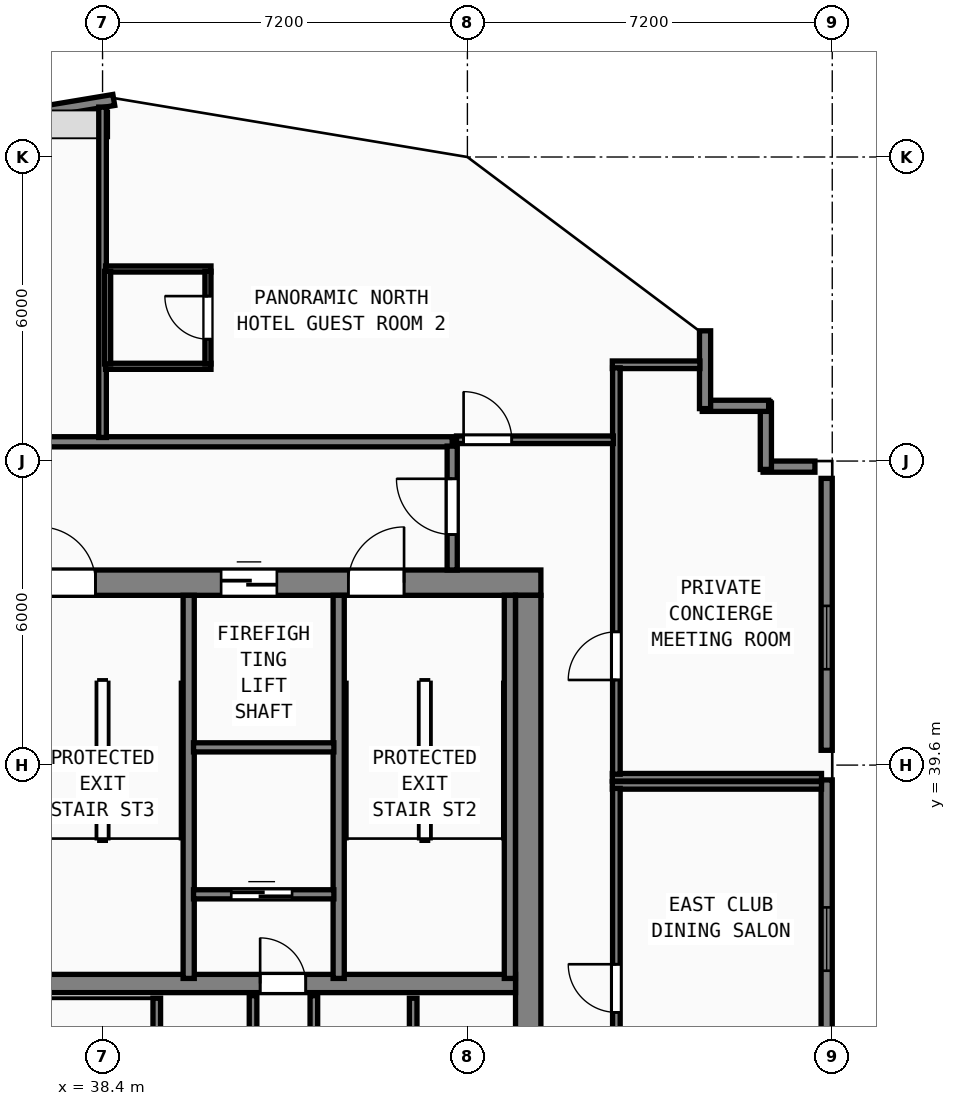
"""IFC4 building model, lengths in metres.
Left out: names, types, materials, properties, quantities, classifications, styles, units other than length and angle.
Written with IfcOpenShell. Run it as: python <this file> out.ifc"""

import sys

from ifc_helpers import new_model, si_unit, direction, frame, frame_2d, origin, origin_2d, place, context, subcontext, project, spatial, rectangle, hollow_rectangle, extrude, element, fill, save


model = new_model("IFC4")
c1 = context("Model", 3, precision=1e-05, world=origin(), true_north=direction((0.0, 1.0)))
c2 = subcontext(c1, "Body", "Model", "MODEL_VIEW")
j1 = project(units=[si_unit("LENGTHUNIT", "METRE"), si_unit("PLANEANGLEUNIT", "RADIAN")], contexts=[c1])
p1 = place(None, origin())
s1 = spatial("IfcSite", under=j1, at=p1, CompositionType="ELEMENT")
p2 = place(p1, origin())
s2 = spatial("IfcBuilding", under=s1, at=p2, CompositionType="ELEMENT")
p3 = place(p2, frame((0.0, 0.0, 282.2)))
s3 = spatial("IfcBuildingStorey", under=s2, at=p3, CompositionType="ELEMENT", Elevation=282.2)
p4 = place(p3, frame((29.75, 43.2, 0.0), z_axis=(0.0, 0.0, 1.0), x_axis=(1.0, 0.0, 0.0)))
e1 = element("IfcWall", 1, at=p4, inside=s3, PredefinedType="SHEAR", context=c2, shape_type="SweptSolid", body=[
    extrude(rectangle(XDim=17.3, YDim=0.5, at=frame_2d((8.65, 0.0))), origin(), (0.0, 0.0, 1.0), 3.72),
])
p5 = place(p4, frame((2.3, 0.0, 0.0)))
e2 = element("IfcOpeningElement", 2, at=p5, cuts=e1, PredefinedType="OPENING", context=c2, shape_type="SweptSolid", body=[
    extrude(rectangle(XDim=1.1, YDim=2.15, at=frame_2d((0.55, 1.075))), frame((0.0, 0.26, 0.0), z_axis=(0.0, -1.0, 0.0), x_axis=(1.0, 0.0, 0.0)), (0.0, 0.0, 1.0), 0.52),
])
p6 = place(p4, frame((7.41, 0.0, 0.0)))
e3 = element("IfcOpeningElement", 3, at=p6, cuts=e1, PredefinedType="OPENING", context=c2, shape_type="SweptSolid", body=[
    extrude(rectangle(XDim=1.1, YDim=2.15, at=frame_2d((0.55, 1.075))), frame((0.0, 0.26, 0.0), z_axis=(0.0, -1.0, 0.0), x_axis=(1.0, 0.0, 0.0)), (0.0, 0.0, 1.0), 0.52),
])
p7 = place(p4, frame((13.5, 0.0, 0.0)))
e4 = element("IfcOpeningElement", 4, at=p7, cuts=e1, PredefinedType="OPENING", context=c2, shape_type="SweptSolid", body=[
    extrude(rectangle(XDim=1.1, YDim=2.15, at=frame_2d((0.55, 1.075))), frame((0.0, 0.26, 0.0), z_axis=(0.0, -1.0, 0.0), x_axis=(1.0, 0.0, 0.0)), (0.0, 0.0, 1.0), 0.52),
])
p8 = place(p4, frame((4.63, 0.0, 0.0)))
e5 = element("IfcOpeningElement", 5, at=p8, cuts=e1, PredefinedType="OPENING", context=c2, shape_type="SweptSolid", body=[
    extrude(rectangle(XDim=1.1, YDim=2.2, at=frame_2d((0.55, 1.1))), frame((0.0, 0.26, 0.0), z_axis=(0.0, -1.0, 0.0), x_axis=(1.0, 0.0, 0.0)), (0.0, 0.0, 1.0), 0.52),
])
p9 = place(p4, frame((10.99, 0.0, 0.0)))
e6 = element("IfcOpeningElement", 6, at=p9, cuts=e1, PredefinedType="OPENING", context=c2, shape_type="SweptSolid", body=[
    extrude(rectangle(XDim=1.1, YDim=2.2, at=frame_2d((0.55, 1.1))), frame((0.0, 0.26, 0.0), z_axis=(0.0, -1.0, 0.0), x_axis=(1.0, 0.0, 0.0)), (0.0, 0.0, 1.0), 0.52),
])
p10 = place(p3, frame((46.8, 32.8, 0.0), z_axis=(0.0, 0.0, 1.0), x_axis=(0.0, 1.0, 0.0)))
e7 = element("IfcWall", 7, at=p10, inside=s3, PredefinedType="SHEAR", context=c2, shape_type="SweptSolid", body=[
    extrude(rectangle(XDim=10.15, YDim=0.5, at=frame_2d((5.075, 0.0))), origin(), (0.0, 0.0, 1.0), 3.72),
])
p11 = place(p3, frame((30.25, 35.29, 0.0), z_axis=(0.0, 0.0, 1.0), x_axis=(1.0, 0.0, 0.0)))
e8 = element("IfcWall", 8, at=p11, inside=s3, PredefinedType="SHEAR", context=c2, shape_type="SweptSolid", body=[
    extrude(rectangle(XDim=16.3, YDim=0.36, at=frame_2d((8.15, 0.0))), origin(), (0.0, 0.0, 1.0), 3.72),
])
p12 = place(p11, frame((5.1, 0.0, 0.0), z_axis=(0.0, 0.0, 1.0), x_axis=(-1.0, 0.0, 0.0)))
e9 = element("IfcOpeningElement", 9, at=p12, cuts=e8, PredefinedType="OPENING", context=c2, shape_type="SweptSolid", body=[
    extrude(rectangle(XDim=0.9, YDim=2.1, at=frame_2d((0.45, 1.05))), frame((0.0, 0.19, 0.0), z_axis=(0.0, -1.0, 0.0), x_axis=(1.0, 0.0, 0.0)), (0.0, 0.0, 1.0), 0.38),
])
p13 = place(p11, frame((12.16, 0.0, 0.0), z_axis=(0.0, 0.0, 1.0), x_axis=(-1.0, 0.0, 0.0)))
e10 = element("IfcOpeningElement", 10, at=p13, cuts=e8, PredefinedType="OPENING", context=c2, shape_type="SweptSolid", body=[
    extrude(rectangle(XDim=0.9, YDim=2.1, at=frame_2d((0.45, 1.05))), frame((0.0, 0.19, 0.0), z_axis=(0.0, -1.0, 0.0), x_axis=(1.0, 0.0, 0.0)), (0.0, 0.0, 1.0), 0.38),
])
for number, where, z_axis, x_axis in (
    (11, (40.1, 35.39, 0.0), (0.0, 0.0, 1.0), (0.0, 1.0, 0.0)),
    (12, (43.06, 35.39, 0.0), (0.0, 0.0, 1.0), (0.0, 1.0, 0.0)),
    (13, (46.438, 35.39, 0.0), (0.0, 0.0, 1.0), (0.0, 1.0, 0.0)),
):
    element("IfcWall", number, at=place(p3, frame(where, z_axis=z_axis, x_axis=x_axis)), inside=s3, PredefinedType="SHEAR", context=c2, shape_type="SweptSolid", body=[
        extrude(rectangle(XDim=7.56, YDim=0.22, at=frame_2d((3.78, 0.0))), origin(), (0.0, 0.0, 1.0), 3.72),
    ])
for number, where, z_axis, x_axis in (
    (14, (52.8, 45.6, 0.0), (0.0, 0.0, 1.0), (1.0, 0.0, 0.0)),
    (15, (45.6, 50.4, 0.0), (0.0, 0.0, 1.0), (1.0, 0.0, 0.0)),
):
    element("IfcColumn", number, at=place(p3, frame(where, z_axis=z_axis, x_axis=x_axis)), inside=s3, PredefinedType="COLUMN", context=c2, shape_type="SweptSolid", body=[
        extrude(hollow_rectangle(XDim=0.7, YDim=0.7, WallThickness=0.026, at=origin_2d()), origin(), (0.0, 0.0, 1.0), 3.9),
    ])
for number, where, z_axis, x_axis in (
    (16, (52.8, 39.6, 0.0), (0.0, 0.0, 1.0), (1.0, 0.0, 0.0)),
    (17, (38.4, 50.4, 0.0), (0.0, 0.0, 1.0), (1.0, 0.0, 0.0)),
):
    element("IfcColumn", number, at=place(p3, frame(where, z_axis=z_axis, x_axis=x_axis)), inside=s3, PredefinedType="COLUMN", context=c2, shape_type="SweptSolid", body=[
        extrude(hollow_rectangle(XDim=0.6, YDim=0.6, WallThickness=0.024, at=origin_2d()), origin(), (0.0, 0.0, 1.0), 3.9),
    ])
p14 = place(p3, frame((52.69, 33.942, 0.0), z_axis=(0.0, 0.0, 1.0), x_axis=(0.0, 1.0, 0.0)))
e18 = element("IfcWall", 18, at=p14, inside=s3, PredefinedType="SOLIDWALL", context=c2, shape_type="SweptSolid", body=[
    extrude(rectangle(XDim=5.366, YDim=0.22, at=frame_2d((2.683, 0.0))), origin(), (0.0, 0.0, 1.0), 3.365),
])
p15 = place(p14, frame((1.6, 0.0, 0.85)))
e19 = element("IfcOpeningElement", 19, at=p15, cuts=e18, PredefinedType="OPENING", context=c2, shape_type="SweptSolid", body=[
    extrude(rectangle(XDim=1.25, YDim=1.95, at=frame_2d((0.625, 0.975))), frame((0.0, 0.12, 0.0), z_axis=(0.0, -1.0, 0.0), x_axis=(1.0, 0.0, 0.0)), (0.0, 0.0, 1.0), 0.24),
])
p16 = place(p3, frame((52.69, 39.892, 0.0), z_axis=(0.0, 0.0, 1.0), x_axis=(0.0, 1.0, 0.0)))
e20 = element("IfcWall", 20, at=p16, inside=s3, PredefinedType="SOLIDWALL", context=c2, shape_type="SweptSolid", body=[
    extrude(rectangle(XDim=5.366, YDim=0.22, at=frame_2d((2.683, 0.0))), origin(), (0.0, 0.0, 1.0), 3.365),
])
p17 = place(p16, frame((1.6, 0.0, 0.85)))
e21 = element("IfcOpeningElement", 21, at=p17, cuts=e20, PredefinedType="OPENING", context=c2, shape_type="SweptSolid", body=[
    extrude(rectangle(XDim=1.25, YDim=1.95, at=frame_2d((0.625, 0.975))), frame((0.0, 0.12, 0.0), z_axis=(0.0, -1.0, 0.0), x_axis=(1.0, 0.0, 0.0)), (0.0, 0.0, 1.0), 0.24),
])
p18 = place(p3, frame((52.458, 45.49, 0.0), z_axis=(0.0, 0.0, 1.0), x_axis=(-1.0, 0.0, 0.0)))
e22 = element("IfcWall", 22, at=p18, inside=s3, PredefinedType="SOLIDWALL", context=c2, shape_type="SweptSolid", body=[
    extrude(rectangle(XDim=1.023, YDim=0.22, at=frame_2d((0.511, 0.0))), origin(), (0.0, 0.0, 1.0), 3.72),
])
p19 = place(p3, frame((51.49, 45.435, 0.0), z_axis=(0.0, 0.0, 1.0), x_axis=(0.0, 1.0, 0.0)))
e23 = element("IfcWall", 23, at=p19, inside=s3, PredefinedType="SOLIDWALL", context=c2, shape_type="SweptSolid", body=[
    extrude(rectangle(XDim=1.31, YDim=0.22, at=frame_2d((0.655, 0.0))), origin(), (0.0, 0.0, 1.0), 3.72),
])
p20 = place(p3, frame((51.545, 46.69, 0.0), z_axis=(0.0, 0.0, 1.0), x_axis=(-1.0, 0.0, 0.0)))
e24 = element("IfcWall", 24, at=p20, inside=s3, PredefinedType="SOLIDWALL", context=c2, shape_type="SweptSolid", body=[
    extrude(rectangle(XDim=1.31, YDim=0.22, at=frame_2d((0.655, 0.0))), origin(), (0.0, 0.0, 1.0), 3.72),
])
p21 = place(p3, frame((50.29, 46.635, 0.0), z_axis=(0.0, 0.0, 1.0), x_axis=(0.0, 1.0, 0.0)))
e25 = element("IfcWall", 25, at=p21, inside=s3, PredefinedType="SOLIDWALL", context=c2, shape_type="SweptSolid", body=[
    extrude(rectangle(XDim=1.535, YDim=0.22, at=frame_2d((0.768, 0.0))), origin(), (0.0, 0.0, 1.0), 3.72),
])
p22 = place(p3, frame((38.622, 52.726, 0.0), z_axis=(0.0, 0.0, 1.0), x_axis=(-0.986390420428, -0.164420006349, 0.0)))
e26 = element("IfcWall", 26, at=p22, inside=s3, PredefinedType="SOLIDWALL", context=c2, shape_type="SweptSolid", body=[
    extrude(rectangle(XDim=7.534, YDim=0.22, at=frame_2d((3.767, 0.0))), origin(), (0.0, 0.0, 1.0), 3.72),
])
p23 = place(p22, frame((1.6, 0.0, 0.85)))
e27 = element("IfcOpeningElement", 27, at=p23, cuts=e26, PredefinedType="OPENING", context=c2, shape_type="SweptSolid", body=[
    extrude(rectangle(XDim=1.25, YDim=1.95, at=frame_2d((0.625, 0.975))), frame((0.0, 0.12, 0.0), z_axis=(0.0, -1.0, 0.0), x_axis=(1.0, 0.0, 0.0)), (0.0, 0.0, 1.0), 0.24),
])
p24 = place(p3, frame((31.5, 45.98, 0.0), z_axis=(0.0, 0.0, 1.0), x_axis=(1.0, 0.0, 0.0)))
e28 = element("IfcWall", 28, at=p24, inside=s3, PredefinedType="SOLIDWALL", context=c2, shape_type="SweptSolid", body=[
    extrude(rectangle(XDim=13.8, YDim=0.2, at=frame_2d((6.9, 0.0))), origin(), (0.0, 0.0, 1.0), 3.72),
])
p25 = place(p3, frame((45.3, 43.45, 0.0), z_axis=(0.0, 0.0, 1.0), x_axis=(0.0, 1.0, 0.0)))
e29 = element("IfcWall", 29, at=p25, inside=s3, PredefinedType="SOLIDWALL", context=c2, shape_type="SweptSolid", body=[
    extrude(rectangle(XDim=2.445, YDim=0.2, at=frame_2d((1.223, 0.0))), origin(), (0.0, 0.0, 1.0), 3.72),
])
p26 = place(p25, frame((0.7, 0.0, 0.0)))
e30 = element("IfcOpeningElement", 30, at=p26, cuts=e29, PredefinedType="OPENING", context=c2, shape_type="SweptSolid", body=[
    extrude(rectangle(XDim=1.1, YDim=2.15, at=frame_2d((0.55, 1.075))), frame((0.0, 0.11, 0.0), z_axis=(0.0, -1.0, 0.0), x_axis=(1.0, 0.0, 0.0)), (0.0, 0.0, 1.0), 0.22),
])
p27 = place(p3, frame((40.195, 39.95, 0.0), z_axis=(0.0, 0.0, 1.0), x_axis=(1.0, 0.0, 0.0)))
e31 = element("IfcWall", 31, at=p27, inside=s3, PredefinedType="SOLIDWALL", context=c2, shape_type="SweptSolid", body=[
    extrude(rectangle(XDim=2.77, YDim=0.18, at=frame_2d((1.385, 0.0))), origin(), (0.0, 0.0, 1.0), 3.72),
])
p28 = place(p3, frame((40.195, 37.05, 0.0), z_axis=(0.0, 0.0, 1.0), x_axis=(1.0, 0.0, 0.0)))
e32 = element("IfcWall", 32, at=p28, inside=s3, PredefinedType="SOLIDWALL", context=c2, shape_type="SweptSolid", body=[
    extrude(rectangle(XDim=2.77, YDim=0.18, at=frame_2d((1.385, 0.0))), origin(), (0.0, 0.0, 1.0), 3.72),
])
p29 = place(p28, frame((1.945, 0.0, 0.0), z_axis=(0.0, 0.0, 1.0), x_axis=(-1.0, 0.0, 0.0)))
e33 = element("IfcOpeningElement", 33, at=p29, cuts=e32, PredefinedType="OPENING", context=c2, shape_type="SweptSolid", body=[
    extrude(rectangle(XDim=1.2, YDim=2.2, at=frame_2d((0.6, 1.1))), frame((0.0, 0.1, 0.0), z_axis=(0.0, -1.0, 0.0), x_axis=(1.0, 0.0, 0.0)), (0.0, 0.0, 1.0), 0.2),
])
for number, where, z_axis, x_axis in (
    (34, (41.37, 32.88, 0.0), (0.0, 0.0, 1.0), (0.0, 1.0, 0.0)),
    (35, (42.57, 32.88, 0.0), (0.0, 0.0, 1.0), (0.0, 1.0, 0.0)),
):
    element("IfcWall", number, at=place(p3, frame(where, z_axis=z_axis, x_axis=x_axis)), inside=s3, PredefinedType="SOLIDWALL", context=c2, shape_type="SweptSolid", body=[
        extrude(rectangle(XDim=2.17, YDim=0.15, at=frame_2d((1.085, 0.0))), origin(), (0.0, 0.0, 1.0), 3.72),
    ])
for number, where, z_axis, x_axis in (
    (36, (39.47, 32.95, 0.0), (0.0, 0.0, 1.0), (0.0, 1.0, 0.0)),
    (37, (44.53, 32.95, 0.0), (0.0, 0.0, 1.0), (0.0, 1.0, 0.0)),
):
    element("IfcWall", number, at=place(p3, frame(where, z_axis=z_axis, x_axis=x_axis)), inside=s3, PredefinedType="SOLIDWALL", context=c2, shape_type="SweptSolid", body=[
        extrude(rectangle(XDim=2.05, YDim=0.15, at=frame_2d((1.025, 0.0))), origin(), (0.0, 0.0, 1.0), 3.72),
    ])
p30 = place(p3, frame((48.46, 39.2, 0.0), z_axis=(0.0, 0.0, 1.0), x_axis=(1.0, 0.0, 0.0)))
e38 = element("IfcWall", 38, at=p30, inside=s3, PredefinedType="PARTITIONING", context=c2, shape_type="SweptSolid", body=[
    extrude(rectangle(XDim=4.128, YDim=0.15, at=frame_2d((2.064, 0.0))), origin(), (0.0, 0.0, 1.0), 3.72),
])
p31 = place(p3, frame((48.54, 33.06, 0.0), z_axis=(0.0, 0.0, 1.0), x_axis=(0.0, 1.0, 0.0)))
e39 = element("IfcWall", 39, at=p31, inside=s3, PredefinedType="PARTITIONING", context=c2, shape_type="SweptSolid", body=[
    extrude(rectangle(XDim=6.08, YDim=0.15, at=frame_2d((3.04, 0.0))), origin(), (0.0, 0.0, 1.0), 3.72),
])
p32 = place(p31, frame((1.66, 0.0, 0.0)))
e40 = element("IfcOpeningElement", 40, at=p32, cuts=e39, PredefinedType="OPENING", context=c2, shape_type="SweptSolid", body=[
    extrude(rectangle(XDim=0.95, YDim=2.12, at=frame_2d((0.475, 1.06))), frame((0.0, 0.085, 0.0), z_axis=(0.0, -1.0, 0.0), x_axis=(1.0, 0.0, 0.0)), (0.0, 0.0, 1.0), 0.17),
])
p33 = place(p3, frame((48.46, 47.5, 0.0), z_axis=(0.0, 0.0, 1.0), x_axis=(1.0, 0.0, 0.0)))
e41 = element("IfcWall", 41, at=p33, inside=s3, PredefinedType="PARTITIONING", context=c2, shape_type="SweptSolid", body=[
    extrude(rectangle(XDim=1.728, YDim=0.15, at=frame_2d((0.864, 0.0))), origin(), (0.0, 0.0, 1.0), 3.72),
])
p34 = place(p3, frame((48.46, 39.36, 0.0), z_axis=(0.0, 0.0, 1.0), x_axis=(1.0, 0.0, 0.0)))
e42 = element("IfcWall", 42, at=p34, inside=s3, PredefinedType="PARTITIONING", context=c2, shape_type="SweptSolid", body=[
    extrude(rectangle(XDim=4.128, YDim=0.15, at=frame_2d((2.064, 0.0))), origin(), (0.0, 0.0, 1.0), 3.72),
])
p35 = place(p3, frame((48.54, 39.42, 0.0), z_axis=(0.0, 0.0, 1.0), x_axis=(0.0, 1.0, 0.0)))
e43 = element("IfcWall", 43, at=p35, inside=s3, PredefinedType="PARTITIONING", context=c2, shape_type="SweptSolid", body=[
    extrude(rectangle(XDim=8.02, YDim=0.15, at=frame_2d((4.01, 0.0))), origin(), (0.0, 0.0, 1.0), 3.72),
])
p36 = place(p35, frame((1.86, 0.0, 0.0)))
e44 = element("IfcOpeningElement", 44, at=p36, cuts=e43, PredefinedType="OPENING", context=c2, shape_type="SweptSolid", body=[
    extrude(rectangle(XDim=0.95, YDim=2.12, at=frame_2d((0.475, 1.06))), frame((0.0, 0.085, 0.0), z_axis=(0.0, -1.0, 0.0), x_axis=(1.0, 0.0, 0.0)), (0.0, 0.0, 1.0), 0.17),
])
p37 = place(p3, frame((38.4, 46.065, 0.0), z_axis=(0.0, 0.0, 1.0), x_axis=(0.0, 1.0, 0.0)))
e45 = element("IfcWall", 45, at=p37, inside=s3, PredefinedType="PARTITIONING", context=c2, shape_type="SweptSolid", body=[
    extrude(rectangle(XDim=6.52, YDim=0.15, at=frame_2d((3.26, 0.0))), origin(), (0.0, 0.0, 1.0), 3.72),
])
p38 = place(p3, frame((45.385, 46.02, 0.0), z_axis=(0.0, 0.0, 1.0), x_axis=(1.0, 0.0, 0.0)))
e46 = element("IfcWall", 46, at=p38, inside=s3, PredefinedType="PARTITIONING", context=c2, shape_type="SweptSolid", body=[
    extrude(rectangle(XDim=3.095, YDim=0.15, at=frame_2d((1.547, 0.0))), origin(), (0.0, 0.0, 1.0), 3.72),
])
p39 = place(p38, frame((0.14, 0.0, 0.0)))
e47 = element("IfcOpeningElement", 47, at=p39, cuts=e46, PredefinedType="OPENING", context=c2, shape_type="SweptSolid", body=[
    extrude(rectangle(XDim=0.95, YDim=2.15, at=frame_2d((0.475, 1.075))), frame((0.0, 0.085, 0.0), z_axis=(0.0, -1.0, 0.0), x_axis=(1.0, 0.0, 0.0)), (0.0, 0.0, 1.0), 0.17),
])
for number, where, z_axis, x_axis in (
    (48, (38.46, 49.39, 0.0), (0.0, 0.0, 1.0), (1.0, 0.0, 0.0)),
    (49, (38.46, 47.47, 0.0), (0.0, 0.0, 1.0), (1.0, 0.0, 0.0)),
):
    element("IfcWall", number, at=place(p3, frame(where, z_axis=z_axis, x_axis=x_axis)), inside=s3, PredefinedType="PARTITIONING", context=c2, shape_type="SweptSolid", body=[
        extrude(rectangle(XDim=2.08, YDim=0.12, at=frame_2d((1.04, 0.0))), origin(), (0.0, 0.0, 1.0), 3.72),
    ])
p40 = place(p3, frame((38.5, 47.515, 0.0), z_axis=(0.0, 0.0, 1.0), x_axis=(0.0, 1.0, 0.0)))
e50 = element("IfcWall", 50, at=p40, inside=s3, PredefinedType="PARTITIONING", context=c2, shape_type="SweptSolid", body=[
    extrude(rectangle(XDim=1.83, YDim=0.12, at=frame_2d((0.915, 0.0))), origin(), (0.0, 0.0, 1.0), 3.72),
])
p41 = place(p3, frame((40.48, 47.515, 0.0), z_axis=(0.0, 0.0, 1.0), x_axis=(0.0, 1.0, 0.0)))
e51 = element("IfcWall", 51, at=p41, inside=s3, PredefinedType="PARTITIONING", context=c2, shape_type="SweptSolid", body=[
    extrude(rectangle(XDim=1.83, YDim=0.12, at=frame_2d((0.915, 0.0))), origin(), (0.0, 0.0, 1.0), 3.72),
])
p42 = place(p41, frame((0.49, 0.0, 0.0)))
e52 = element("IfcOpeningElement", 52, at=p42, cuts=e51, PredefinedType="OPENING", context=c2, shape_type="SweptSolid", body=[
    extrude(rectangle(XDim=0.85, YDim=2.1, at=frame_2d((0.425, 1.05))), frame((0.0, 0.07, 0.0), z_axis=(0.0, -1.0, 0.0), x_axis=(1.0, 0.0, 0.0)), (0.0, 0.0, 1.0), 0.14),
])
p43 = place(p15, origin())
e53 = element("IfcWindow", 53, at=p43, inside=s3, PartitioningType="SINGLE_PANEL", PredefinedType="WINDOW", context=c2, shape_type="SweptSolid", body=[
    extrude(rectangle(XDim=1.25, YDim=1.95, at=frame_2d((0.625, 0.975))), frame((0.0, 0.03, 0.0), z_axis=(0.0, -1.0, 0.0), x_axis=(1.0, 0.0, 0.0)), (0.0, 0.0, 1.0), 0.06),
])
fill(e19, e53)
p44 = place(p17, origin())
e54 = element("IfcWindow", 54, at=p44, inside=s3, PartitioningType="SINGLE_PANEL", PredefinedType="WINDOW", context=c2, shape_type="SweptSolid", body=[
    extrude(rectangle(XDim=1.25, YDim=1.95, at=frame_2d((0.625, 0.975))), frame((0.0, 0.03, 0.0), z_axis=(0.0, -1.0, 0.0), x_axis=(1.0, 0.0, 0.0)), (0.0, 0.0, 1.0), 0.06),
])
fill(e21, e54)
p45 = place(p6, origin())
e55 = element("IfcDoor", 55, at=p45, inside=s3, OperationType="SINGLE_SWING_LEFT", PredefinedType="DOOR", context=c2, shape_type="SweptSolid", body=[
    extrude(rectangle(XDim=1.1, YDim=2.15, at=frame_2d((0.55, 1.075))), frame((0.0, 0.185, 0.0), z_axis=(0.0, -1.0, 0.0), x_axis=(1.0, 0.0, 0.0)), (0.0, 0.0, 1.0), 0.05),
])
fill(e3, e55)
p46 = place(p7, origin())
e56 = element("IfcDoor", 56, at=p46, inside=s3, OperationType="SINGLE_SWING_RIGHT", PredefinedType="DOOR", context=c2, shape_type="SweptSolid", body=[
    extrude(rectangle(XDim=1.1, YDim=2.15, at=frame_2d((0.55, 1.075))), frame((0.0, 0.185, 0.0), z_axis=(0.0, -1.0, 0.0), x_axis=(1.0, 0.0, 0.0)), (0.0, 0.0, 1.0), 0.05),
])
fill(e4, e56)
p47 = place(p26, origin())
e57 = element("IfcDoor", 57, at=p47, inside=s3, OperationType="SINGLE_SWING_RIGHT", PredefinedType="DOOR", context=c2, shape_type="SweptSolid", body=[
    extrude(rectangle(XDim=1.1, YDim=2.15, at=frame_2d((0.55, 1.075))), frame((0.0, 0.025, 0.0), z_axis=(0.0, -1.0, 0.0), x_axis=(1.0, 0.0, 0.0)), (0.0, 0.0, 1.0), 0.05),
])
fill(e30, e57)
p48 = place(p9, origin())
e58 = element("IfcDoor", 58, at=p48, inside=s3, OperationType="SLIDING_TO_LEFT", PredefinedType="DOOR", context=c2, shape_type="SweptSolid", body=[
    extrude(rectangle(XDim=1.1, YDim=2.2, at=frame_2d((0.55, 1.1))), frame((0.0, 0.185, 0.0), z_axis=(0.0, -1.0, 0.0), x_axis=(1.0, 0.0, 0.0)), (0.0, 0.0, 1.0), 0.05),
])
fill(e6, e58)
p49 = place(p29, origin())
e59 = element("IfcDoor", 59, at=p49, inside=s3, OperationType="SLIDING_TO_RIGHT", PredefinedType="DOOR", context=c2, shape_type="SweptSolid", body=[
    extrude(rectangle(XDim=1.2, YDim=2.2, at=frame_2d((0.6, 1.1))), frame((0.0, 0.025, 0.0), z_axis=(0.0, -1.0, 0.0), x_axis=(1.0, 0.0, 0.0)), (0.0, 0.0, 1.0), 0.05),
])
fill(e33, e59)
p50 = place(p13, origin())
e60 = element("IfcDoor", 60, at=p50, inside=s3, OperationType="SINGLE_SWING_RIGHT", PredefinedType="DOOR", context=c2, shape_type="SweptSolid", body=[
    extrude(rectangle(XDim=0.9, YDim=2.1, at=frame_2d((0.45, 1.05))), frame((0.0, 0.025, 0.0), z_axis=(0.0, -1.0, 0.0), x_axis=(1.0, 0.0, 0.0)), (0.0, 0.0, 1.0), 0.05),
])
fill(e10, e60)
p51 = place(p32, origin())
e61 = element("IfcDoor", 61, at=p51, inside=s3, OperationType="SINGLE_SWING_RIGHT", PredefinedType="DOOR", context=c2, shape_type="SweptSolid", body=[
    extrude(rectangle(XDim=0.95, YDim=2.12, at=frame_2d((0.475, 1.06))), frame((0.0, 0.025, 0.0), z_axis=(0.0, -1.0, 0.0), x_axis=(1.0, 0.0, 0.0)), (0.0, 0.0, 1.0), 0.05),
])
fill(e40, e61)
p52 = place(p36, origin())
e62 = element("IfcDoor", 62, at=p52, inside=s3, OperationType="SINGLE_SWING_LEFT", PredefinedType="DOOR", context=c2, shape_type="SweptSolid", body=[
    extrude(rectangle(XDim=0.95, YDim=2.12, at=frame_2d((0.475, 1.06))), frame((0.0, 0.025, 0.0), z_axis=(0.0, -1.0, 0.0), x_axis=(1.0, 0.0, 0.0)), (0.0, 0.0, 1.0), 0.05),
])
fill(e44, e62)
p53 = place(p39, origin())
e63 = element("IfcDoor", 63, at=p53, inside=s3, OperationType="SINGLE_SWING_LEFT", PredefinedType="DOOR", context=c2, shape_type="SweptSolid", body=[
    extrude(rectangle(XDim=0.95, YDim=2.15, at=frame_2d((0.475, 1.075))), frame((0.0, 0.025, 0.0), z_axis=(0.0, -1.0, 0.0), x_axis=(1.0, 0.0, 0.0)), (0.0, 0.0, 1.0), 0.05),
])
fill(e47, e63)
p54 = place(p42, origin())
e64 = element("IfcDoor", 64, at=p54, inside=s3, OperationType="SINGLE_SWING_RIGHT", PredefinedType="DOOR", context=c2, shape_type="SweptSolid", body=[
    extrude(rectangle(XDim=0.85, YDim=2.1, at=frame_2d((0.425, 1.05))), frame((0.0, 0.025, 0.0), z_axis=(0.0, -1.0, 0.0), x_axis=(1.0, 0.0, 0.0)), (0.0, 0.0, 1.0), 0.05),
])
fill(e52, e64)
save(model, sys.argv[1])
